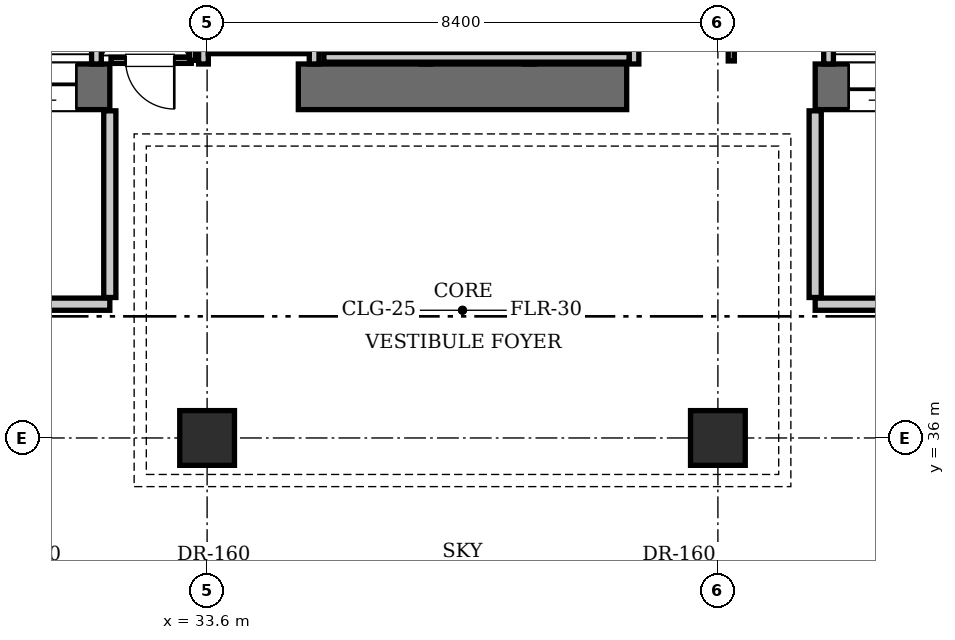
"""IFC4 building model, lengths in metres.
Left out: names, types, materials, properties, quantities, classifications, styles, units other than length and angle.
Written with IfcOpenShell. Run it as: python <this file> out.ifc"""

import sys

from ifc_helpers import new_model, si_unit, direction, frame, frame_2d, origin, origin_2d, place, context, subcontext, project, spatial, rectangle, extrude, element, fill, save


model = new_model("IFC4")
c1 = context("Model", 3, precision=1e-05, world=origin(), true_north=direction((0.0, 1.0)))
c2 = subcontext(c1, "Body", "Model", "MODEL_VIEW")
j1 = project(units=[si_unit("LENGTHUNIT", "METRE"), si_unit("PLANEANGLEUNIT", "RADIAN")], contexts=[c1])
p1 = place(None, origin())
s1 = spatial("IfcSite", under=j1, at=p1, CompositionType="ELEMENT")
p2 = place(p1, origin())
s2 = spatial("IfcBuilding", under=s1, at=p2, CompositionType="ELEMENT")
p3 = place(p2, frame((0.0, 0.0, 122.5)))
s3 = spatial("IfcBuildingStorey", under=s2, at=p3, CompositionType="ELEMENT", Elevation=122.5)
p4 = place(p3, frame((25.2, 41.775, 0.0), z_axis=(0.0, 0.0, 1.0), x_axis=(1.0, 0.0, 0.0)))
e1 = element("IfcWall", 1, at=p4, inside=s3, PredefinedType="SHEAR", context=c2, shape_type="SweptSolid", body=[
    extrude(rectangle(XDim=6.8, YDim=0.75, at=frame_2d((3.4, 0.0))), origin(), (0.0, 0.0, 1.0), 4.9),
])
p5 = place(p4, frame((1.65, 0.0, 0.0)))
e2 = element("IfcOpeningElement", 2, at=p5, cuts=e1, PredefinedType="OPENING", context=c2, shape_type="SweptSolid", body=[
    extrude(rectangle(XDim=1.15, YDim=2.15, at=frame_2d((0.575, 1.075))), frame((0.0, 0.385, 0.0), z_axis=(0.0, -1.0, 0.0), x_axis=(1.0, 0.0, 0.0)), (0.0, 0.0, 1.0), 0.77),
])
p6 = place(p4, frame((5.15, 0.0, 0.0)))
e3 = element("IfcOpeningElement", 3, at=p6, cuts=e1, PredefinedType="OPENING", context=c2, shape_type="SweptSolid", body=[
    extrude(rectangle(XDim=1.1, YDim=2.2, at=frame_2d((0.55, 1.1))), frame((0.0, 0.385, 0.0), z_axis=(0.0, -1.0, 0.0), x_axis=(1.0, 0.0, 0.0)), (0.0, 0.0, 1.0), 0.77),
])
p7 = place(p3, frame((35.1, 41.775, 0.0), z_axis=(0.0, 0.0, 1.0), x_axis=(1.0, 0.0, 0.0)))
e4 = element("IfcWall", 4, at=p7, inside=s3, PredefinedType="SHEAR", context=c2, shape_type="SweptSolid", body=[
    extrude(rectangle(XDim=5.4, YDim=0.75, at=frame_2d((2.7, 0.0))), origin(), (0.0, 0.0, 1.0), 4.9),
])
p8 = place(p3, frame((43.6, 41.775, 0.0), z_axis=(0.0, 0.0, 1.0), x_axis=(1.0, 0.0, 0.0)))
e5 = element("IfcWall", 5, at=p8, inside=s3, PredefinedType="SHEAR", context=c2, shape_type="SweptSolid", body=[
    extrude(rectangle(XDim=6.8, YDim=0.75, at=frame_2d((3.4, 0.0))), origin(), (0.0, 0.0, 1.0), 4.9),
])
p9 = place(p8, frame((3.9, 0.0, 0.0)))
e6 = element("IfcOpeningElement", 6, at=p9, cuts=e5, PredefinedType="OPENING", context=c2, shape_type="SweptSolid", body=[
    extrude(rectangle(XDim=1.15, YDim=2.15, at=frame_2d((0.575, 1.075))), frame((0.0, 0.385, 0.0), z_axis=(0.0, -1.0, 0.0), x_axis=(1.0, 0.0, 0.0)), (0.0, 0.0, 1.0), 0.77),
])
p10 = place(p8, frame((0.55, 0.0, 0.0)))
e7 = element("IfcOpeningElement", 7, at=p10, cuts=e5, PredefinedType="OPENING", context=c2, shape_type="SweptSolid", body=[
    extrude(rectangle(XDim=1.1, YDim=2.2, at=frame_2d((0.55, 1.1))), frame((0.0, 0.385, 0.0), z_axis=(0.0, -1.0, 0.0), x_axis=(1.0, 0.0, 0.0)), (0.0, 0.0, 1.0), 0.77),
])
for number, where, z_axis, x_axis in (
    (8, (33.6, 36.0, 0.0), (0.0, 0.0, 1.0), (1.0, 0.0, 0.0)),
    (9, (42.0, 36.0, 0.0), (0.0, 0.0, 1.0), (1.0, 0.0, 0.0)),
):
    element("IfcColumn", number, at=place(p3, frame(where, z_axis=z_axis, x_axis=x_axis)), inside=s3, PredefinedType="COLUMN", context=c2, shape_type="SweptSolid", body=[
        extrude(rectangle(XDim=0.9, YDim=0.9, at=origin_2d()), origin(), (0.0, 0.0, 1.0), 4.9),
    ])
for number, where, z_axis, x_axis in (
    (10, (31.78, 42.15, 0.0), (0.0, 0.0, 1.0), (0.0, 1.0, 0.0)),
    (11, (43.82, 42.15, 0.0), (0.0, 0.0, 1.0), (0.0, 1.0, 0.0)),
):
    element("IfcWall", number, at=place(p3, frame(where, z_axis=z_axis, x_axis=x_axis)), inside=s3, PredefinedType="SOLIDWALL", context=c2, shape_type="SweptSolid", body=[
        extrude(rectangle(XDim=2.59, YDim=0.16, at=frame_2d((1.295, 0.0))), origin(), (0.0, 0.0, 1.0), 4.66),
    ])
for number, where, z_axis, x_axis in (
    (12, (37.2, 42.15, 0.0), (0.0, 0.0, 1.0), (0.0, 1.0, 0.0)),
    (13, (38.9, 42.15, 0.0), (0.0, 0.0, 1.0), (0.0, 1.0, 0.0)),
    (14, (40.62, 42.15, 0.0), (0.0, 0.0, 1.0), (0.0, 1.0, 0.0)),
):
    element("IfcWall", number, at=place(p3, frame(where, z_axis=z_axis, x_axis=x_axis)), inside=s3, PredefinedType="SOLIDWALL", context=c2, shape_type="SweptSolid", body=[
        extrude(rectangle(XDim=2.2, YDim=0.16, at=frame_2d((1.1, 0.0))), origin(), (0.0, 0.0, 1.0), 4.66),
    ])
p11 = place(p3, frame((35.52, 42.26, 0.0), z_axis=(0.0, 0.0, 1.0), x_axis=(1.0, 0.0, 0.0)))
e15 = element("IfcWall", 15, at=p11, inside=s3, PredefinedType="SOLIDWALL", context=c2, shape_type="SweptSolid", body=[
    extrude(rectangle(XDim=5.02, YDim=0.16, at=frame_2d((2.51, 0.0))), origin(), (0.0, 0.0, 1.0), 4.66),
])
for number, where, z_axis, x_axis in (
    (16, (33.54, 42.15, 0.0), (0.0, 0.0, 1.0), (0.0, 1.0, 0.0)),
    (17, (35.36, 42.15, 0.0), (0.0, 0.0, 1.0), (0.0, 1.0, 0.0)),
):
    element("IfcWall", number, at=place(p3, frame(where, z_axis=z_axis, x_axis=x_axis)), inside=s3, PredefinedType="SOLIDWALL", context=c2, shape_type="SweptSolid", body=[
        extrude(rectangle(XDim=2.25, YDim=0.16, at=frame_2d((1.125, 0.0))), origin(), (0.0, 0.0, 1.0), 4.66),
    ])
p12 = place(p3, frame((33.62, 42.4, 0.0), z_axis=(0.0, 0.0, 1.0), x_axis=(1.0, 0.0, 0.0)))
e18 = element("IfcWall", 18, at=p12, inside=s3, PredefinedType="SOLIDWALL", context=c2, shape_type="SweptSolid", body=[
    extrude(rectangle(XDim=1.66, YDim=0.16, at=frame_2d((0.83, 0.0))), origin(), (0.0, 0.0, 1.0), 4.66),
])
p13 = place(p3, frame((26.2, 38.2, 0.0), z_axis=(0.0, 0.0, 1.0), x_axis=(1.0, 0.0, 0.0)))
e19 = element("IfcWall", 19, at=p13, inside=s3, PredefinedType="PARTITIONING", context=c2, shape_type="SweptSolid", body=[
    extrude(rectangle(XDim=5.8, YDim=0.2, at=frame_2d((2.9, 0.0))), origin(), (0.0, 0.0, 1.0), 4.66),
])
p14 = place(p13, frame((2.3, 0.0, 0.0)))
e20 = element("IfcOpeningElement", 20, at=p14, cuts=e19, PredefinedType="OPENING", context=c2, shape_type="SweptSolid", body=[
    extrude(rectangle(XDim=1.15, YDim=2.15, at=frame_2d((0.575, 1.075))), frame((0.0, 0.11, 0.0), z_axis=(0.0, -1.0, 0.0), x_axis=(1.0, 0.0, 0.0)), (0.0, 0.0, 1.0), 0.22),
])
p15 = place(p3, frame((32.0, 38.31, 0.0), z_axis=(0.0, 0.0, 1.0), x_axis=(0.0, 1.0, 0.0)))
e21 = element("IfcWall", 21, at=p15, inside=s3, PredefinedType="PARTITIONING", context=c2, shape_type="SweptSolid", body=[
    extrude(rectangle(XDim=3.07, YDim=0.2, at=frame_2d((1.535, 0.0))), origin(), (0.0, 0.0, 1.0), 4.66),
])
p16 = place(p3, frame((43.6, 38.2, 0.0), z_axis=(0.0, 0.0, 1.0), x_axis=(1.0, 0.0, 0.0)))
e22 = element("IfcWall", 22, at=p16, inside=s3, PredefinedType="PARTITIONING", context=c2, shape_type="SweptSolid", body=[
    extrude(rectangle(XDim=5.8, YDim=0.2, at=frame_2d((2.9, 0.0))), origin(), (0.0, 0.0, 1.0), 4.66),
])
p17 = place(p16, frame((2.3, 0.0, 0.0)))
e23 = element("IfcOpeningElement", 23, at=p17, cuts=e22, PredefinedType="OPENING", context=c2, shape_type="SweptSolid", body=[
    extrude(rectangle(XDim=1.15, YDim=2.15, at=frame_2d((0.575, 1.075))), frame((0.0, 0.11, 0.0), z_axis=(0.0, -1.0, 0.0), x_axis=(1.0, 0.0, 0.0)), (0.0, 0.0, 1.0), 0.22),
])
p18 = place(p3, frame((43.6, 38.31, 0.0), z_axis=(0.0, 0.0, 1.0), x_axis=(0.0, 1.0, 0.0)))
e24 = element("IfcWall", 24, at=p18, inside=s3, PredefinedType="PARTITIONING", context=c2, shape_type="SweptSolid", body=[
    extrude(rectangle(XDim=3.07, YDim=0.2, at=frame_2d((1.535, 0.0))), origin(), (0.0, 0.0, 1.0), 4.66),
])
p19 = place(p3, frame((32.02, 42.21, 0.0), z_axis=(0.0, 0.0, 1.0), x_axis=(1.0, 0.0, 0.0)))
e25 = element("IfcWall", 25, at=p19, inside=s3, PredefinedType="PARTITIONING", context=c2, shape_type="SweptSolid", body=[
    extrude(rectangle(XDim=1.32, YDim=0.1, at=frame_2d((0.66, 0.0))), origin(), (0.0, 0.0, 1.0), 4.66),
])
p20 = place(p19, frame((0.24, 0.0, 0.0)))
e26 = element("IfcOpeningElement", 26, at=p20, cuts=e25, PredefinedType="OPENING", context=c2, shape_type="SweptSolid", body=[
    extrude(rectangle(XDim=0.8, YDim=2.05, at=frame_2d((0.4, 1.025))), frame((0.0, 0.06, 0.0), z_axis=(0.0, -1.0, 0.0), x_axis=(1.0, 0.0, 0.0)), (0.0, 0.0, 1.0), 0.12),
])
p21 = place(p3, frame((33.36, 42.21, 0.0), z_axis=(0.0, 0.0, 1.0), x_axis=(0.0, 1.0, 0.0)))
e27 = element("IfcWall", 27, at=p21, inside=s3, PredefinedType="PARTITIONING", context=c2, shape_type="SweptSolid", body=[
    extrude(rectangle(XDim=2.73, YDim=0.1, at=frame_2d((1.365, 0.0))), origin(), (0.0, 0.0, 1.0), 4.66),
])
p22 = place(p3, frame((42.22, 42.2, 0.0), z_axis=(0.0, 0.0, 1.0), x_axis=(0.0, 1.0, 0.0)))
e28 = element("IfcWall", 28, at=p22, inside=s3, PredefinedType="PARTITIONING", context=c2, shape_type="SweptSolid", body=[
    extrude(rectangle(XDim=2.76, YDim=0.1, at=frame_2d((1.38, 0.0))), origin(), (0.0, 0.0, 1.0), 4.66),
])
p23 = place(p22, frame((0.65, 0.0, 0.0)))
e29 = element("IfcOpeningElement", 29, at=p23, cuts=e28, PredefinedType="OPENING", context=c2, shape_type="SweptSolid", body=[
    extrude(rectangle(XDim=0.8, YDim=2.05, at=frame_2d((0.4, 1.025))), frame((0.0, 0.06, 0.0), z_axis=(0.0, -1.0, 0.0), x_axis=(1.0, 0.0, 0.0)), (0.0, 0.0, 1.0), 0.12),
])
p24 = place(p6, frame((1.1, 0.0, 0.0), z_axis=(0.0, 0.0, 1.0), x_axis=(-1.0, 0.0, 0.0)))
e30 = element("IfcDoor", 30, at=p24, inside=s3, OperationType="SLIDING_TO_LEFT", PredefinedType="DOOR", context=c2, shape_type="SweptSolid", body=[
    extrude(rectangle(XDim=1.1, YDim=2.2, at=frame_2d((0.55, 1.1))), frame((0.0, 0.025, 0.0), z_axis=(0.0, -1.0, 0.0), x_axis=(1.0, 0.0, 0.0)), (0.0, 0.0, 1.0), 0.05),
])
fill(e3, e30)
p25 = place(p10, frame((1.1, 0.0, 0.0), z_axis=(0.0, 0.0, 1.0), x_axis=(-1.0, 0.0, 0.0)))
e31 = element("IfcDoor", 31, at=p25, inside=s3, OperationType="SLIDING_TO_LEFT", PredefinedType="DOOR", context=c2, shape_type="SweptSolid", body=[
    extrude(rectangle(XDim=1.1, YDim=2.2, at=frame_2d((0.55, 1.1))), frame((0.0, 0.025, 0.0), z_axis=(0.0, -1.0, 0.0), x_axis=(1.0, 0.0, 0.0)), (0.0, 0.0, 1.0), 0.05),
])
fill(e7, e31)
p26 = place(p20, frame((0.8, 0.0, 0.0), z_axis=(0.0, 0.0, 1.0), x_axis=(-1.0, 0.0, 0.0)))
e32 = element("IfcDoor", 32, at=p26, inside=s3, OperationType="SINGLE_SWING_LEFT", PredefinedType="DOOR", context=c2, shape_type="SweptSolid", body=[
    extrude(rectangle(XDim=0.8, YDim=2.05, at=frame_2d((0.4, 1.025))), frame((0.0, 0.025, 0.0), z_axis=(0.0, -1.0, 0.0), x_axis=(1.0, 0.0, 0.0)), (0.0, 0.0, 1.0), 0.05),
])
fill(e26, e32)
save(model, sys.argv[1])
